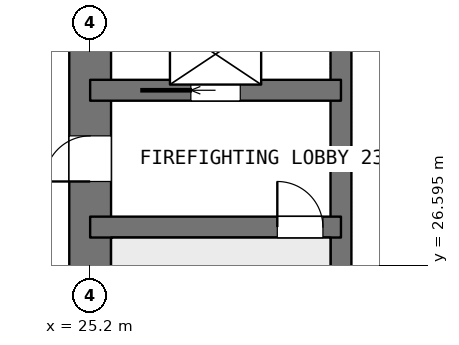
"""IFC4 building model, lengths in metres.
Left out: names, types, materials, properties, quantities, classifications, styles, units other than length and angle.
Written with IfcOpenShell. Run it as: python <this file> out.ifc"""

import sys

from ifc_helpers import new_model, si_unit, direction, frame, frame_2d, origin, place, context, subcontext, project, spatial, rectangle, extrude, element, fill, save


model = new_model("IFC4")
c1 = context("Model", 3, precision=1e-05, world=origin(), true_north=direction((0.0, 1.0)))
c2 = subcontext(c1, "Body", "Model", "MODEL_VIEW")
j1 = project(units=[si_unit("LENGTHUNIT", "METRE"), si_unit("PLANEANGLEUNIT", "RADIAN")], contexts=[c1])
p1 = place(None, origin())
s1 = spatial("IfcSite", under=j1, at=p1, CompositionType="ELEMENT")
p2 = place(p1, origin())
s2 = spatial("IfcBuilding", under=s1, at=p2, CompositionType="ELEMENT")
p3 = place(p2, frame((0.0, 0.0, 47.9)))
s3 = spatial("IfcBuildingStorey", under=s2, at=p3, CompositionType="ELEMENT", Elevation=47.9)
p4 = place(p3, frame((25.2, 21.0, 0.0), z_axis=(0.0, 0.0, 1.0), x_axis=(0.0, 1.0, 0.0)))
e1 = element("IfcWall", 1, at=p4, inside=s3, PredefinedType="SHEAR", context=c2, shape_type="SweptSolid", body=[
    extrude(rectangle(XDim=25.2, YDim=1.1, at=frame_2d((12.6, 0.0))), origin(), (0.0, 0.0, 1.0), 3.75),
])
p5 = place(p4, frame((7.8, 0.0, 0.0)))
e2 = element("IfcOpeningElement", 2, at=p5, cuts=e1, PredefinedType="OPENING", context=c2, shape_type="SweptSolid", body=[
    extrude(rectangle(XDim=1.2, YDim=2.1, at=frame_2d((0.6, 1.05))), frame((0.0, 0.56, 0.0), z_axis=(0.0, -1.0, 0.0), x_axis=(1.0, 0.0, 0.0)), (0.0, 0.0, 1.0), 1.12),
])
p6 = place(p4, frame((14.25, 0.0, 0.0)))
e3 = element("IfcOpeningElement", 3, at=p6, cuts=e1, PredefinedType="OPENING", context=c2, shape_type="SweptSolid", body=[
    extrude(rectangle(XDim=0.9, YDim=2.1, at=frame_2d((0.45, 1.05))), frame((0.0, 0.56, 0.0), z_axis=(0.0, -1.0, 0.0), x_axis=(1.0, 0.0, 0.0)), (0.0, 0.0, 1.0), 1.12),
])
p7 = place(p4, frame((16.85, 0.0, 0.0)))
e4 = element("IfcOpeningElement", 4, at=p7, cuts=e1, PredefinedType="OPENING", context=c2, shape_type="SweptSolid", body=[
    extrude(rectangle(XDim=0.9, YDim=2.1, at=frame_2d((0.45, 1.05))), frame((0.0, 0.56, 0.0), z_axis=(0.0, -1.0, 0.0), x_axis=(1.0, 0.0, 0.0)), (0.0, 0.0, 1.0), 1.12),
])
p8 = place(p4, frame((19.075, 0.0, 0.0)))
e5 = element("IfcOpeningElement", 5, at=p8, cuts=e1, PredefinedType="OPENING", context=c2, shape_type="SweptSolid", body=[
    extrude(rectangle(XDim=1.2, YDim=2.1, at=frame_2d((0.6, 1.05))), frame((0.0, 0.56, 0.0), z_axis=(0.0, -1.0, 0.0), x_axis=(1.0, 0.0, 0.0)), (0.0, 0.0, 1.0), 1.12),
])
p9 = place(p3, frame((31.8, 21.0, 0.0), z_axis=(0.0, 0.0, 1.0), x_axis=(0.0, 1.0, 0.0)))
e6 = element("IfcWall", 6, at=p9, inside=s3, PredefinedType="SHEAR", context=c2, shape_type="SweptSolid", body=[
    extrude(rectangle(XDim=25.2, YDim=0.55, at=frame_2d((12.6, 0.0))), origin(), (0.0, 0.0, 1.0), 3.75),
])
p10 = place(p3, frame((25.2, 27.6, 0.0), z_axis=(0.0, 0.0, 1.0), x_axis=(1.0, 0.0, 0.0)))
e7 = element("IfcWall", 7, at=p10, inside=s3, PredefinedType="SHEAR", context=c2, shape_type="SweptSolid", body=[
    extrude(rectangle(XDim=6.6, YDim=0.55, at=frame_2d((3.3, 0.0))), origin(), (0.0, 0.0, 1.0), 3.75),
])
p11 = place(p10, frame((4.925, 0.0, 0.0)))
e8 = element("IfcOpeningElement", 8, at=p11, cuts=e7, PredefinedType="OPENING", context=c2, shape_type="SweptSolid", body=[
    extrude(rectangle(XDim=1.2, YDim=2.1, at=frame_2d((0.6, 1.05))), frame((0.0, 0.285, 0.0), z_axis=(0.0, -1.0, 0.0), x_axis=(1.0, 0.0, 0.0)), (0.0, 0.0, 1.0), 0.57),
])
p12 = place(p3, frame((25.2, 31.2, 0.0), z_axis=(0.0, 0.0, 1.0), x_axis=(1.0, 0.0, 0.0)))
e9 = element("IfcWall", 9, at=p12, inside=s3, PredefinedType="SHEAR", context=c2, shape_type="SweptSolid", body=[
    extrude(rectangle(XDim=6.6, YDim=0.55, at=frame_2d((3.3, 0.0))), origin(), (0.0, 0.0, 1.0), 3.75),
])
p13 = place(p12, frame((2.65, 0.0, 0.0)))
e10 = element("IfcOpeningElement", 10, at=p13, cuts=e9, PredefinedType="OPENING", context=c2, shape_type="SweptSolid", body=[
    extrude(rectangle(XDim=1.3, YDim=2.1, at=frame_2d((0.65, 1.05))), frame((0.0, 0.285, 0.0), z_axis=(0.0, -1.0, 0.0), x_axis=(1.0, 0.0, 0.0)), (0.0, 0.0, 1.0), 0.57),
])
p14 = place(p3, frame((32.075, 29.4, 0.0), z_axis=(0.0, 0.0, 1.0), x_axis=(1.0, 0.0, 0.0)))
e11 = element("IfcWall", 11, at=p14, inside=s3, PredefinedType="PARTITIONING", context=c2, shape_type="SweptSolid", body=[
    extrude(rectangle(XDim=3.25, YDim=0.2, at=frame_2d((1.625, 0.0))), origin(), (0.0, 0.0, 1.0), 3.5),
])
p15 = place(p5, origin())
e12 = element("IfcDoor", 12, at=p15, inside=s3, OperationType="SINGLE_SWING_LEFT", PredefinedType="DOOR", context=c2, shape_type="SweptSolid", body=[
    extrude(rectangle(XDim=1.2, YDim=2.1, at=frame_2d((0.6, 1.05))), frame((0.0, 0.025, 0.0), z_axis=(0.0, -1.0, 0.0), x_axis=(1.0, 0.0, 0.0)), (0.0, 0.0, 1.0), 0.05),
])
fill(e2, e12)
p16 = place(p13, origin())
e13 = element("IfcDoor", 13, at=p16, inside=s3, OperationType="SLIDING_TO_LEFT", PredefinedType="USERDEFINED", context=c2, shape_type="SweptSolid", body=[
    extrude(rectangle(XDim=1.3, YDim=2.1, at=frame_2d((0.65, 1.05))), frame((0.0, 0.025, 0.0), z_axis=(0.0, -1.0, 0.0), x_axis=(1.0, 0.0, 0.0)), (0.0, 0.0, 1.0), 0.05),
])
fill(e10, e13)
p17 = place(p11, origin())
e14 = element("IfcDoor", 14, at=p17, inside=s3, OperationType="SINGLE_SWING_RIGHT", PredefinedType="DOOR", context=c2, shape_type="SweptSolid", body=[
    extrude(rectangle(XDim=1.2, YDim=2.1, at=frame_2d((0.6, 1.05))), frame((0.0, 0.025, 0.0), z_axis=(0.0, -1.0, 0.0), x_axis=(1.0, 0.0, 0.0)), (0.0, 0.0, 1.0), 0.05),
])
fill(e8, e14)
save(model, sys.argv[1])
